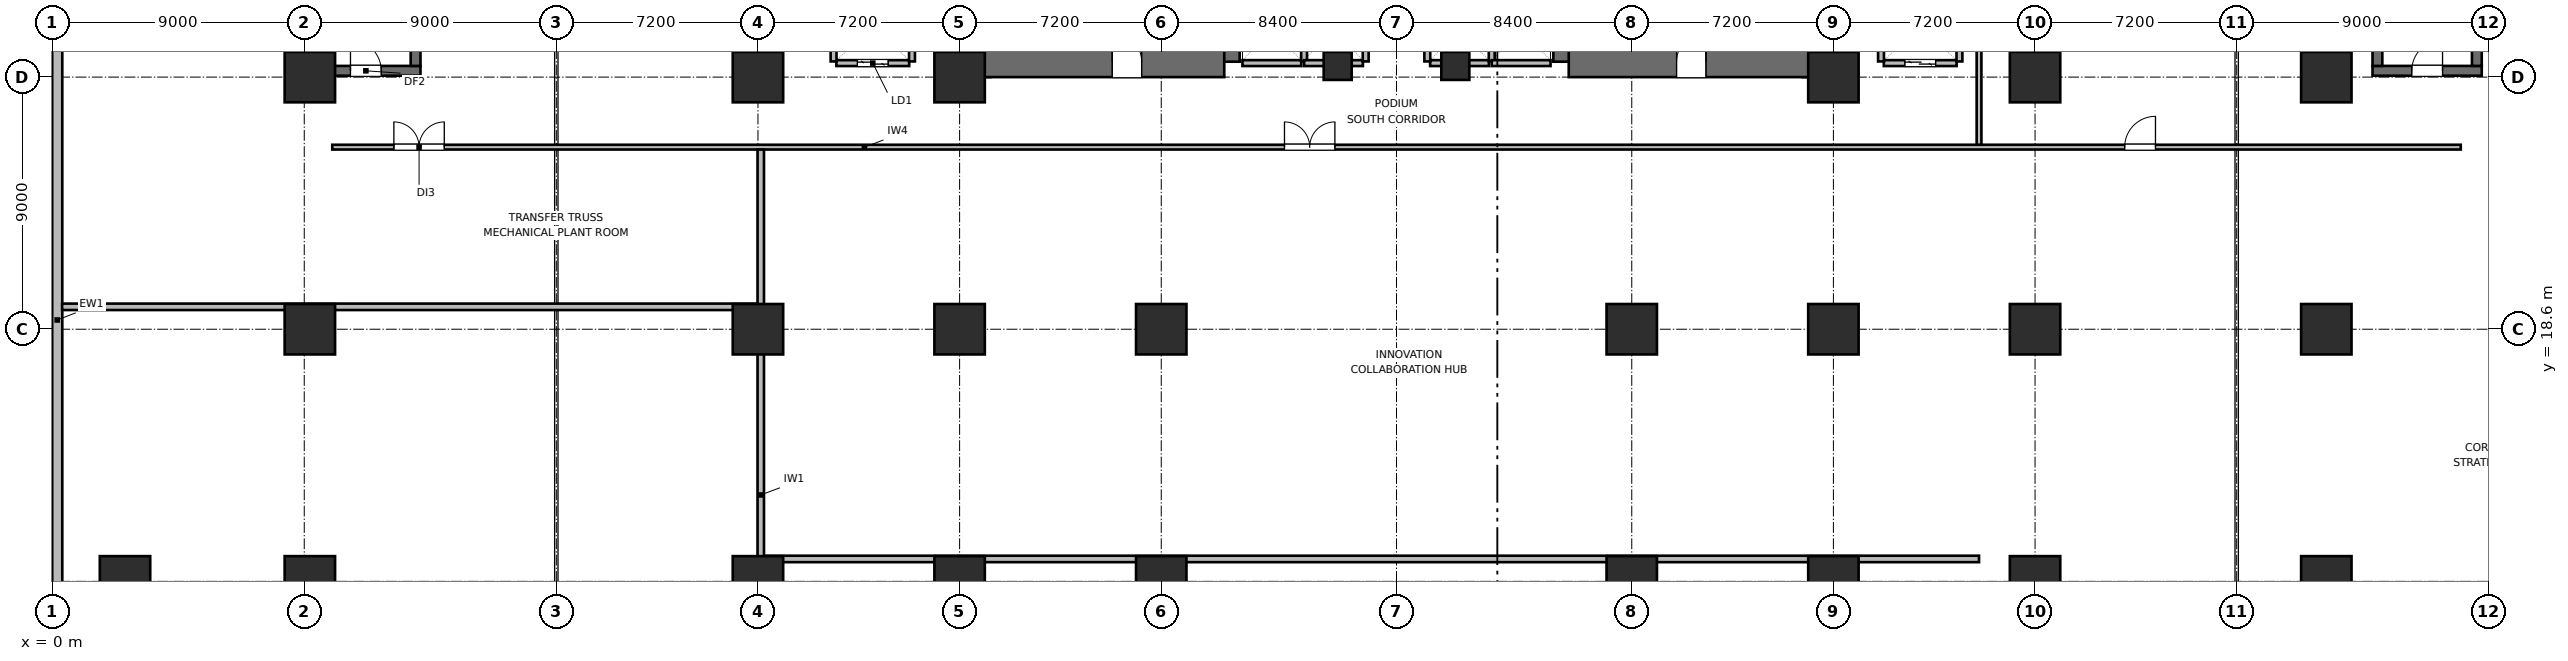
"""IFC4 building model, lengths in metres.
Left out: names, types, materials, properties, quantities, classifications, styles, units other than length and angle.
Written with IfcOpenShell. Run it as: python <this file> out.ifc"""

import sys

from ifc_helpers import new_model, si_unit, direction, frame, frame_2d, origin, origin_2d, place, context, subcontext, project, spatial, rectangle, extrude, element, fill, save


model = new_model("IFC4")
c1 = context("Model", 3, precision=1e-05, world=origin(), true_north=direction((0.0, 1.0)))
c2 = subcontext(c1, "Body", "Model", "MODEL_VIEW")
j1 = project(units=[si_unit("LENGTHUNIT", "METRE"), si_unit("PLANEANGLEUNIT", "RADIAN")], contexts=[c1])
p1 = place(None, origin())
s1 = spatial("IfcSite", under=j1, at=p1, CompositionType="ELEMENT")
p2 = place(p1, origin())
s2 = spatial("IfcBuilding", under=s1, at=p2, CompositionType="ELEMENT")
p3 = place(p2, frame((0.0, 0.0, 17.1)))
s3 = spatial("IfcBuildingStorey", under=s2, at=p3, CompositionType="ELEMENT", Elevation=17.1)
p4 = place(p3, frame((32.95, 27.6, 0.0), z_axis=(0.0, 0.0, 1.0), x_axis=(0.0, 1.0, 0.0)))
e1 = element("IfcWall", 1, at=p4, inside=s3, PredefinedType="SHEAR", context=c2, shape_type="SweptSolid", body=[
    extrude(rectangle(XDim=16.8, YDim=1.1, at=frame_2d((8.4, 0.0))), origin(), (0.0, 0.0, 1.0), 4.5),
])
p5 = place(p3, frame((41.85, 28.15, 0.0), z_axis=(0.0, 0.0, 1.0), x_axis=(0.0, 1.0, 0.0)))
e2 = element("IfcWall", 2, at=p5, inside=s3, PredefinedType="SHEAR", context=c2, shape_type="SweptSolid", body=[
    extrude(rectangle(XDim=6.25, YDim=1.1, at=frame_2d((3.125, 0.0))), origin(), (0.0, 0.0, 1.0), 4.5),
])
p6 = place(p3, frame((32.95, 28.15, 0.0), z_axis=(0.0, 0.0, 1.0), x_axis=(1.0, 0.0, 0.0)))
e3 = element("IfcWall", 3, at=p6, inside=s3, PredefinedType="SHEAR", context=c2, shape_type="SweptSolid", body=[
    extrude(rectangle(XDim=8.9, YDim=1.1, at=frame_2d((4.45, 0.0))), origin(), (0.0, 0.0, 1.0), 4.5),
])
p7 = place(p6, frame((4.9, 0.0, 0.0)))
e4 = element("IfcOpeningElement", 4, at=p7, cuts=e3, PredefinedType="OPENING", context=c2, shape_type="SweptSolid", body=[
    extrude(rectangle(XDim=1.05, YDim=2.04, at=frame_2d((0.525, 1.02))), frame((0.0, 0.56, 0.0), z_axis=(0.0, -1.0, 0.0), x_axis=(1.0, 0.0, 0.0)), (0.0, 0.0, 1.0), 1.12),
])
p8 = place(p3, frame((54.15, 28.15, 0.0), z_axis=(0.0, 0.0, 1.0), x_axis=(0.0, 1.0, 0.0)))
e5 = element("IfcWall", 5, at=p8, inside=s3, PredefinedType="SHEAR", context=c2, shape_type="SweptSolid", body=[
    extrude(rectangle(XDim=7.65, YDim=1.1, at=frame_2d((3.825, 0.0))), origin(), (0.0, 0.0, 1.0), 4.5),
])
p9 = place(p3, frame((63.05, 27.6, 0.0), z_axis=(0.0, 0.0, 1.0), x_axis=(0.0, 1.0, 0.0)))
e6 = element("IfcWall", 6, at=p9, inside=s3, PredefinedType="SHEAR", context=c2, shape_type="SweptSolid", body=[
    extrude(rectangle(XDim=16.8, YDim=1.1, at=frame_2d((8.4, 0.0))), origin(), (0.0, 0.0, 1.0), 4.5),
])
p10 = place(p3, frame((54.15, 28.15, 0.0), z_axis=(0.0, 0.0, 1.0), x_axis=(1.0, 0.0, 0.0)))
e7 = element("IfcWall", 7, at=p10, inside=s3, PredefinedType="SHEAR", context=c2, shape_type="SweptSolid", body=[
    extrude(rectangle(XDim=8.9, YDim=1.1, at=frame_2d((4.45, 0.0))), origin(), (0.0, 0.0, 1.0), 4.5),
])
p11 = place(p10, frame((3.85, 0.0, 0.0)))
e8 = element("IfcOpeningElement", 8, at=p11, cuts=e7, PredefinedType="OPENING", context=c2, shape_type="SweptSolid", body=[
    extrude(rectangle(XDim=1.05, YDim=2.04, at=frame_2d((0.525, 1.02))), frame((0.0, 0.56, 0.0), z_axis=(0.0, -1.0, 0.0), x_axis=(1.0, 0.0, 0.0)), (0.0, 0.0, 1.0), 1.12),
])
p12 = place(p3, frame((9.25, 27.825, 0.0), z_axis=(0.0, 0.0, 1.0), x_axis=(1.0, 0.0, 0.0)))
e9 = element("IfcWall", 9, at=p12, inside=s3, PredefinedType="SHEAR", context=c2, shape_type="SweptSolid", body=[
    extrude(rectangle(XDim=3.9, YDim=0.35, at=frame_2d((1.95, 0.0))), origin(), (0.0, 0.0, 1.0), 4.5),
])
p13 = place(p12, frame((1.4, 0.0, 0.0)))
e10 = element("IfcOpeningElement", 10, at=p13, cuts=e9, PredefinedType="OPENING", context=c2, shape_type="SweptSolid", body=[
    extrude(rectangle(XDim=1.1, YDim=2.05, at=frame_2d((0.55, 1.025))), frame((0.0, 0.185, 0.0), z_axis=(0.0, -1.0, 0.0), x_axis=(1.0, 0.0, 0.0)), (0.0, 0.0, 1.0), 0.37),
])
for number, where, z_axis, x_axis in (
    (11, (9.425, 28.0, 0.0), (0.0, 0.0, 1.0), (0.0, 1.0, 0.0)),
    (12, (12.975, 28.0, 0.0), (0.0, 0.0, 1.0), (0.0, 1.0, 0.0)),
):
    element("IfcWall", number, at=place(p3, frame(where, z_axis=z_axis, x_axis=x_axis)), inside=s3, PredefinedType="SHEAR", context=c2, shape_type="SweptSolid", body=[
        extrude(rectangle(XDim=8.4, YDim=0.35, at=frame_2d((4.2, 0.0))), origin(), (0.0, 0.0, 1.0), 4.5),
    ])
p14 = place(p3, frame((82.85, 27.825, 0.0), z_axis=(0.0, 0.0, 1.0), x_axis=(1.0, 0.0, 0.0)))
e13 = element("IfcWall", 13, at=p14, inside=s3, PredefinedType="SHEAR", context=c2, shape_type="SweptSolid", body=[
    extrude(rectangle(XDim=3.9, YDim=0.35, at=frame_2d((1.95, 0.0))), origin(), (0.0, 0.0, 1.0), 4.5),
])
p15 = place(p14, frame((1.4, 0.0, 0.0)))
e14 = element("IfcOpeningElement", 14, at=p15, cuts=e13, PredefinedType="OPENING", context=c2, shape_type="SweptSolid", body=[
    extrude(rectangle(XDim=1.1, YDim=2.05, at=frame_2d((0.55, 1.025))), frame((0.0, 0.185, 0.0), z_axis=(0.0, -1.0, 0.0), x_axis=(1.0, 0.0, 0.0)), (0.0, 0.0, 1.0), 0.37),
])
for number, where, z_axis, x_axis in (
    (15, (83.025, 28.0, 0.0), (0.0, 0.0, 1.0), (0.0, 1.0, 0.0)),
    (16, (86.575, 28.0, 0.0), (0.0, 0.0, 1.0), (0.0, 1.0, 0.0)),
):
    element("IfcWall", number, at=place(p3, frame(where, z_axis=z_axis, x_axis=x_axis)), inside=s3, PredefinedType="SHEAR", context=c2, shape_type="SweptSolid", body=[
        extrude(rectangle(XDim=8.4, YDim=0.35, at=frame_2d((4.2, 0.0))), origin(), (0.0, 0.0, 1.0), 4.5),
    ])
for number, where, z_axis, x_axis in (
    (17, (2.6, 9.6, 0.0), (0.0, 0.0, 1.0), (1.0, 0.0, 0.0)),
    (18, (9.2, 9.6, 0.0), (0.0, 0.0, 1.0), (1.0, 0.0, 0.0)),
    (19, (9.2, 18.6, 0.0), (0.0, 0.0, 1.0), (1.0, 0.0, 0.0)),
    (20, (9.2, 27.6, 0.0), (0.0, 0.0, 1.0), (1.0, 0.0, 0.0)),
    (21, (25.2, 9.6, 0.0), (0.0, 0.0, 1.0), (1.0, 0.0, 0.0)),
    (22, (25.2, 18.6, 0.0), (0.0, 0.0, 1.0), (1.0, 0.0, 0.0)),
    (23, (25.2, 27.6, 0.0), (0.0, 0.0, 1.0), (1.0, 0.0, 0.0)),
    (24, (32.4, 9.6, 0.0), (0.0, 0.0, 1.0), (1.0, 0.0, 0.0)),
    (25, (32.4, 18.6, 0.0), (0.0, 0.0, 1.0), (1.0, 0.0, 0.0)),
    (26, (32.4, 27.6, 0.0), (0.0, 0.0, 1.0), (1.0, 0.0, 0.0)),
    (27, (39.6, 9.6, 0.0), (0.0, 0.0, 1.0), (1.0, 0.0, 0.0)),
    (28, (39.6, 18.6, 0.0), (0.0, 0.0, 1.0), (1.0, 0.0, 0.0)),
    (29, (56.4, 9.6, 0.0), (0.0, 0.0, 1.0), (1.0, 0.0, 0.0)),
    (30, (56.4, 18.6, 0.0), (0.0, 0.0, 1.0), (1.0, 0.0, 0.0)),
    (31, (63.6, 9.6, 0.0), (0.0, 0.0, 1.0), (1.0, 0.0, 0.0)),
    (32, (63.6, 18.6, 0.0), (0.0, 0.0, 1.0), (1.0, 0.0, 0.0)),
    (33, (63.6, 27.6, 0.0), (0.0, 0.0, 1.0), (1.0, 0.0, 0.0)),
    (34, (70.8, 9.6, 0.0), (0.0, 0.0, 1.0), (1.0, 0.0, 0.0)),
    (35, (70.8, 18.6, 0.0), (0.0, 0.0, 1.0), (1.0, 0.0, 0.0)),
    (36, (70.8, 27.6, 0.0), (0.0, 0.0, 1.0), (1.0, 0.0, 0.0)),
    (37, (81.2, 9.6, 0.0), (0.0, 0.0, 1.0), (1.0, 0.0, 0.0)),
    (38, (81.2, 18.6, 0.0), (0.0, 0.0, 1.0), (1.0, 0.0, 0.0)),
    (39, (81.2, 27.6, 0.0), (0.0, 0.0, 1.0), (1.0, 0.0, 0.0)),
):
    element("IfcColumn", number, at=place(p3, frame(where, z_axis=z_axis, x_axis=x_axis)), inside=s3, PredefinedType="COLUMN", context=c2, shape_type="SweptSolid", body=[
        extrude(rectangle(XDim=1.8, YDim=1.8, at=origin_2d()), origin(), (0.0, 0.0, 1.0), 4.5),
    ])
for number, where, z_axis, x_axis in (
    (40, (45.9, 28.0, 0.0), (0.0, 0.0, 1.0), (1.0, 0.0, 0.0)),
    (41, (50.1, 28.0, 0.0), (0.0, 0.0, 1.0), (1.0, 0.0, 0.0)),
):
    element("IfcColumn", number, at=place(p3, frame(where, z_axis=z_axis, x_axis=x_axis)), inside=s3, PredefinedType="COLUMN", context=c2, shape_type="SweptSolid", body=[
        extrude(rectangle(XDim=1.0, YDim=1.0, at=origin_2d()), origin(), (0.0, 0.0, 1.0), 4.5),
    ])
p16 = place(p3, frame((0.18, 0.36, 0.0), z_axis=(0.0, 0.0, 1.0), x_axis=(0.0, 1.0, 0.0)))
e42 = element("IfcWall", 42, at=p16, inside=s3, PredefinedType="SOLIDWALL", context=c2, shape_type="SweptSolid", body=[
    extrude(rectangle(XDim=71.28, YDim=0.36, at=frame_2d((35.64, 0.0))), origin(), (0.0, 0.0, 1.0), 4.24),
])
p17 = place(p3, frame((42.5, 28.1, 0.0), z_axis=(0.0, 0.0, 1.0), x_axis=(1.0, 0.0, 0.0)))
e43 = element("IfcWall", 43, at=p17, inside=s3, PredefinedType="PARTITIONING", context=c2, shape_type="SweptSolid", body=[
    extrude(rectangle(XDim=2.1, YDim=0.21, at=frame_2d((1.05, 0.0))), origin(), (0.0, 0.0, 1.0), 3.125),
])
p18 = place(p3, frame((44.7, 28.16, 0.0), z_axis=(0.0, 0.0, 1.0), x_axis=(0.0, 1.0, 0.0)))
e44 = element("IfcWall", 44, at=p18, inside=s3, PredefinedType="PARTITIONING", context=c2, shape_type="SweptSolid", body=[
    extrude(rectangle(XDim=2.28, YDim=0.21, at=frame_2d((1.14, 0.0))), origin(), (0.0, 0.0, 1.0), 4.24),
])
p19 = place(p3, frame((44.7, 28.1, 0.0), z_axis=(0.0, 0.0, 1.0), x_axis=(1.0, 0.0, 0.0)))
e45 = element("IfcWall", 45, at=p19, inside=s3, PredefinedType="PARTITIONING", context=c2, shape_type="SweptSolid", body=[
    extrude(rectangle(XDim=2.1, YDim=0.21, at=frame_2d((1.05, 0.0))), origin(), (0.0, 0.0, 1.0), 3.125),
])
p20 = place(p3, frame((46.9, 28.16, 0.0), z_axis=(0.0, 0.0, 1.0), x_axis=(0.0, 1.0, 0.0)))
e46 = element("IfcWall", 46, at=p20, inside=s3, PredefinedType="PARTITIONING", context=c2, shape_type="SweptSolid", body=[
    extrude(rectangle(XDim=2.28, YDim=0.21, at=frame_2d((1.14, 0.0))), origin(), (0.0, 0.0, 1.0), 4.24),
])
p21 = place(p3, frame((49.2, 28.1, 0.0), z_axis=(0.0, 0.0, 1.0), x_axis=(1.0, 0.0, 0.0)))
e47 = element("IfcWall", 47, at=p21, inside=s3, PredefinedType="PARTITIONING", context=c2, shape_type="SweptSolid", body=[
    extrude(rectangle(XDim=2.1, YDim=0.21, at=frame_2d((1.05, 0.0))), origin(), (0.0, 0.0, 1.0), 3.125),
])
for number, where, z_axis, x_axis in (
    (48, (49.1, 28.16, 0.0), (0.0, 0.0, 1.0), (0.0, 1.0, 0.0)),
    (49, (51.4, 28.16, 0.0), (0.0, 0.0, 1.0), (0.0, 1.0, 0.0)),
):
    element("IfcWall", number, at=place(p3, frame(where, z_axis=z_axis, x_axis=x_axis)), inside=s3, PredefinedType="PARTITIONING", context=c2, shape_type="SweptSolid", body=[
        extrude(rectangle(XDim=2.28, YDim=0.21, at=frame_2d((1.14, 0.0))), origin(), (0.0, 0.0, 1.0), 4.24),
    ])
p22 = place(p3, frame((51.4, 28.1, 0.0), z_axis=(0.0, 0.0, 1.0), x_axis=(1.0, 0.0, 0.0)))
e50 = element("IfcWall", 50, at=p22, inside=s3, PredefinedType="PARTITIONING", context=c2, shape_type="SweptSolid", body=[
    extrude(rectangle(XDim=2.1, YDim=0.21, at=frame_2d((1.05, 0.0))), origin(), (0.0, 0.0, 1.0), 3.125),
])
p23 = place(p3, frame((28.0, 28.1, 0.0), z_axis=(0.0, 0.0, 1.0), x_axis=(1.0, 0.0, 0.0)))
e51 = element("IfcWall", 51, at=p23, inside=s3, PredefinedType="PARTITIONING", context=c2, shape_type="SweptSolid", body=[
    extrude(rectangle(XDim=2.6, YDim=0.21, at=frame_2d((1.3, 0.0))), origin(), (0.0, 0.0, 1.0), 2.775),
])
p24 = place(p23, frame((0.75, 0.0, 0.0)))
e52 = element("IfcOpeningElement", 52, at=p24, cuts=e51, PredefinedType="OPENING", context=c2, shape_type="SweptSolid", body=[
    extrude(rectangle(XDim=1.1, YDim=2.04, at=frame_2d((0.55, 1.02))), frame((0.0, 0.115, 0.0), z_axis=(0.0, -1.0, 0.0), x_axis=(1.0, 0.0, 0.0)), (0.0, 0.0, 1.0), 0.23),
])
for number, where, z_axis, x_axis in (
    (53, (27.9, 28.16, 0.0), (0.0, 0.0, 1.0), (0.0, 1.0, 0.0)),
    (54, (30.7, 28.16, 0.0), (0.0, 0.0, 1.0), (0.0, 1.0, 0.0)),
):
    element("IfcWall", number, at=place(p3, frame(where, z_axis=z_axis, x_axis=x_axis)), inside=s3, PredefinedType="PARTITIONING", context=c2, shape_type="SweptSolid", body=[
        extrude(rectangle(XDim=2.48, YDim=0.21, at=frame_2d((1.24, 0.0))), origin(), (0.0, 0.0, 1.0), 4.24),
    ])
p25 = place(p3, frame((65.4, 28.1, 0.0), z_axis=(0.0, 0.0, 1.0), x_axis=(1.0, 0.0, 0.0)))
e55 = element("IfcWall", 55, at=p25, inside=s3, PredefinedType="PARTITIONING", context=c2, shape_type="SweptSolid", body=[
    extrude(rectangle(XDim=2.6, YDim=0.21, at=frame_2d((1.3, 0.0))), origin(), (0.0, 0.0, 1.0), 2.775),
])
p26 = place(p25, frame((0.75, 0.0, 0.0)))
e56 = element("IfcOpeningElement", 56, at=p26, cuts=e55, PredefinedType="OPENING", context=c2, shape_type="SweptSolid", body=[
    extrude(rectangle(XDim=1.1, YDim=2.04, at=frame_2d((0.55, 1.02))), frame((0.0, 0.115, 0.0), z_axis=(0.0, -1.0, 0.0), x_axis=(1.0, 0.0, 0.0)), (0.0, 0.0, 1.0), 0.23),
])
for number, where, z_axis, x_axis in (
    (57, (65.3, 28.16, 0.0), (0.0, 0.0, 1.0), (0.0, 1.0, 0.0)),
    (58, (68.1, 28.16, 0.0), (0.0, 0.0, 1.0), (0.0, 1.0, 0.0)),
):
    element("IfcWall", number, at=place(p3, frame(where, z_axis=z_axis, x_axis=x_axis)), inside=s3, PredefinedType="PARTITIONING", context=c2, shape_type="SweptSolid", body=[
        extrude(rectangle(XDim=2.48, YDim=0.21, at=frame_2d((1.24, 0.0))), origin(), (0.0, 0.0, 1.0), 4.24),
    ])
p27 = place(p3, frame((10.0, 25.1, 0.0), z_axis=(0.0, 0.0, 1.0), x_axis=(1.0, 0.0, 0.0)))
e59 = element("IfcWall", 59, at=p27, inside=s3, PredefinedType="PARTITIONING", context=c2, shape_type="SweptSolid", body=[
    extrude(rectangle(XDim=76.0, YDim=0.17, at=frame_2d((38.0, 0.0))), origin(), (0.0, 0.0, 1.0), 4.24),
])
p28 = place(p27, frame((2.2, 0.0, 0.0)))
e60 = element("IfcOpeningElement", 60, at=p28, cuts=e59, PredefinedType="OPENING", context=c2, shape_type="SweptSolid", body=[
    extrude(rectangle(XDim=1.8, YDim=2.06, at=frame_2d((0.9, 1.03))), frame((0.0, 0.095, 0.0), z_axis=(0.0, -1.0, 0.0), x_axis=(1.0, 0.0, 0.0)), (0.0, 0.0, 1.0), 0.19),
])
p29 = place(p27, frame((34.0, 0.0, 0.0)))
e61 = element("IfcOpeningElement", 61, at=p29, cuts=e59, PredefinedType="OPENING", context=c2, shape_type="SweptSolid", body=[
    extrude(rectangle(XDim=1.8, YDim=2.06, at=frame_2d((0.9, 1.03))), frame((0.0, 0.095, 0.0), z_axis=(0.0, -1.0, 0.0), x_axis=(1.0, 0.0, 0.0)), (0.0, 0.0, 1.0), 0.19),
])
p30 = place(p27, frame((64.0, 0.0, 0.0)))
e62 = element("IfcOpeningElement", 62, at=p30, cuts=e59, PredefinedType="OPENING", context=c2, shape_type="SweptSolid", body=[
    extrude(rectangle(XDim=1.1, YDim=2.05, at=frame_2d((0.55, 1.025))), frame((0.0, 0.095, 0.0), z_axis=(0.0, -1.0, 0.0), x_axis=(1.0, 0.0, 0.0)), (0.0, 0.0, 1.0), 0.19),
])
p31 = place(p3, frame((68.8, 25.187, 0.0), z_axis=(0.0, 0.0, 1.0), x_axis=(0.0, 1.0, 0.0)))
e63 = element("IfcWall", 63, at=p31, inside=s3, PredefinedType="PARTITIONING", context=c2, shape_type="SweptSolid", body=[
    extrude(rectangle(XDim=46.448, YDim=0.17, at=frame_2d((23.224, 0.0))), origin(), (0.0, 0.0, 1.0), 4.24),
])
p32 = place(p31, frame((15.913, 0.0, 0.0)))
e64 = element("IfcOpeningElement", 64, at=p32, cuts=e63, PredefinedType="OPENING", context=c2, shape_type="SweptSolid", body=[
    extrude(rectangle(XDim=1.1, YDim=2.05, at=frame_2d((0.55, 1.025))), frame((0.0, 0.095, 0.0), z_axis=(0.0, -1.0, 0.0), x_axis=(1.0, 0.0, 0.0)), (0.0, 0.0, 1.0), 0.19),
])
p33 = place(p3, frame((25.3, 0.355, 0.0), z_axis=(0.0, 0.0, 1.0), x_axis=(0.0, 1.0, 0.0)))
e65 = element("IfcWall", 65, at=p33, inside=s3, PredefinedType="PARTITIONING", context=c2, shape_type="SweptSolid", body=[
    extrude(rectangle(XDim=24.658, YDim=0.23, at=frame_2d((12.329, 0.0))), origin(), (0.0, 0.0, 1.0), 2.775),
])
p34 = place(p3, frame((0.355, 19.4, 0.0), z_axis=(0.0, 0.0, 1.0), x_axis=(1.0, 0.0, 0.0)))
e66 = element("IfcWall", 66, at=p34, inside=s3, PredefinedType="PARTITIONING", context=c2, shape_type="SweptSolid", body=[
    extrude(rectangle(XDim=24.828, YDim=0.23, at=frame_2d((12.414, 0.0))), origin(), (0.0, 0.0, 1.0), 4.24),
])
p35 = place(p3, frame((25.417, 10.4, 0.0), z_axis=(0.0, 0.0, 1.0), x_axis=(1.0, 0.0, 0.0)))
e67 = element("IfcWall", 67, at=p35, inside=s3, PredefinedType="PARTITIONING", context=c2, shape_type="SweptSolid", body=[
    extrude(rectangle(XDim=43.383, YDim=0.23, at=frame_2d((21.691, 0.0))), origin(), (0.0, 0.0, 1.0), 4.24),
])
p36 = place(p13, origin())
e68 = element("IfcDoor", 68, at=p36, inside=s3, OperationType="SINGLE_SWING_LEFT", PredefinedType="DOOR", context=c2, shape_type="SweptSolid", body=[
    extrude(rectangle(XDim=1.1, YDim=2.05, at=frame_2d((0.55, 1.025))), frame((0.0, 0.025, 0.0), z_axis=(0.0, -1.0, 0.0), x_axis=(1.0, 0.0, 0.0)), (0.0, 0.0, 1.0), 0.05),
])
fill(e10, e68)
p37 = place(p15, origin())
e69 = element("IfcDoor", 69, at=p37, inside=s3, OperationType="SINGLE_SWING_RIGHT", PredefinedType="DOOR", context=c2, shape_type="SweptSolid", body=[
    extrude(rectangle(XDim=1.1, YDim=2.05, at=frame_2d((0.55, 1.025))), frame((0.0, 0.025, 0.0), z_axis=(0.0, -1.0, 0.0), x_axis=(1.0, 0.0, 0.0)), (0.0, 0.0, 1.0), 0.05),
])
fill(e14, e69)
p38 = place(p24, origin())
e70 = element("IfcDoor", 70, at=p38, inside=s3, OperationType="DOUBLE_DOOR_SLIDING", PredefinedType="DOOR", context=c2, shape_type="SweptSolid", body=[
    extrude(rectangle(XDim=1.1, YDim=2.04, at=frame_2d((0.55, 1.02))), frame((0.0, 0.025, 0.0), z_axis=(0.0, -1.0, 0.0), x_axis=(1.0, 0.0, 0.0)), (0.0, 0.0, 1.0), 0.05),
])
fill(e52, e70)
p39 = place(p26, origin())
e71 = element("IfcDoor", 71, at=p39, inside=s3, OperationType="DOUBLE_DOOR_SLIDING", PredefinedType="DOOR", context=c2, shape_type="SweptSolid", body=[
    extrude(rectangle(XDim=1.1, YDim=2.04, at=frame_2d((0.55, 1.02))), frame((0.0, 0.025, 0.0), z_axis=(0.0, -1.0, 0.0), x_axis=(1.0, 0.0, 0.0)), (0.0, 0.0, 1.0), 0.05),
])
fill(e56, e71)
p40 = place(p7, origin())
e72 = element("IfcDoor", 72, at=p40, inside=s3, OperationType="SINGLE_SWING_LEFT", PredefinedType="DOOR", context=c2, shape_type="SweptSolid", body=[
    extrude(rectangle(XDim=1.05, YDim=2.04, at=frame_2d((0.525, 1.02))), frame((0.0, 0.025, 0.0), z_axis=(0.0, -1.0, 0.0), x_axis=(1.0, 0.0, 0.0)), (0.0, 0.0, 1.0), 0.05),
])
fill(e4, e72)
p41 = place(p11, origin())
e73 = element("IfcDoor", 73, at=p41, inside=s3, OperationType="SINGLE_SWING_RIGHT", PredefinedType="DOOR", context=c2, shape_type="SweptSolid", body=[
    extrude(rectangle(XDim=1.05, YDim=2.04, at=frame_2d((0.525, 1.02))), frame((0.0, 0.025, 0.0), z_axis=(0.0, -1.0, 0.0), x_axis=(1.0, 0.0, 0.0)), (0.0, 0.0, 1.0), 0.05),
])
fill(e8, e73)
p42 = place(p28, origin())
e74 = element("IfcDoor", 74, at=p42, inside=s3, OperationType="DOUBLE_DOOR_SINGLE_SWING", PredefinedType="DOOR", context=c2, shape_type="SweptSolid", body=[
    extrude(rectangle(XDim=1.8, YDim=2.06, at=frame_2d((0.9, 1.03))), frame((0.0, 0.025, 0.0), z_axis=(0.0, -1.0, 0.0), x_axis=(1.0, 0.0, 0.0)), (0.0, 0.0, 1.0), 0.05),
])
fill(e60, e74)
p43 = place(p29, origin())
e75 = element("IfcDoor", 75, at=p43, inside=s3, OperationType="DOUBLE_DOOR_SINGLE_SWING", PredefinedType="DOOR", context=c2, shape_type="SweptSolid", body=[
    extrude(rectangle(XDim=1.8, YDim=2.06, at=frame_2d((0.9, 1.03))), frame((0.0, 0.025, 0.0), z_axis=(0.0, -1.0, 0.0), x_axis=(1.0, 0.0, 0.0)), (0.0, 0.0, 1.0), 0.05),
])
fill(e61, e75)
p44 = place(p30, origin())
e76 = element("IfcDoor", 76, at=p44, inside=s3, OperationType="SINGLE_SWING_RIGHT", PredefinedType="DOOR", context=c2, shape_type="SweptSolid", body=[
    extrude(rectangle(XDim=1.1, YDim=2.05, at=frame_2d((0.55, 1.025))), frame((0.0, 0.025, 0.0), z_axis=(0.0, -1.0, 0.0), x_axis=(1.0, 0.0, 0.0)), (0.0, 0.0, 1.0), 0.05),
])
fill(e62, e76)
save(model, sys.argv[1])
